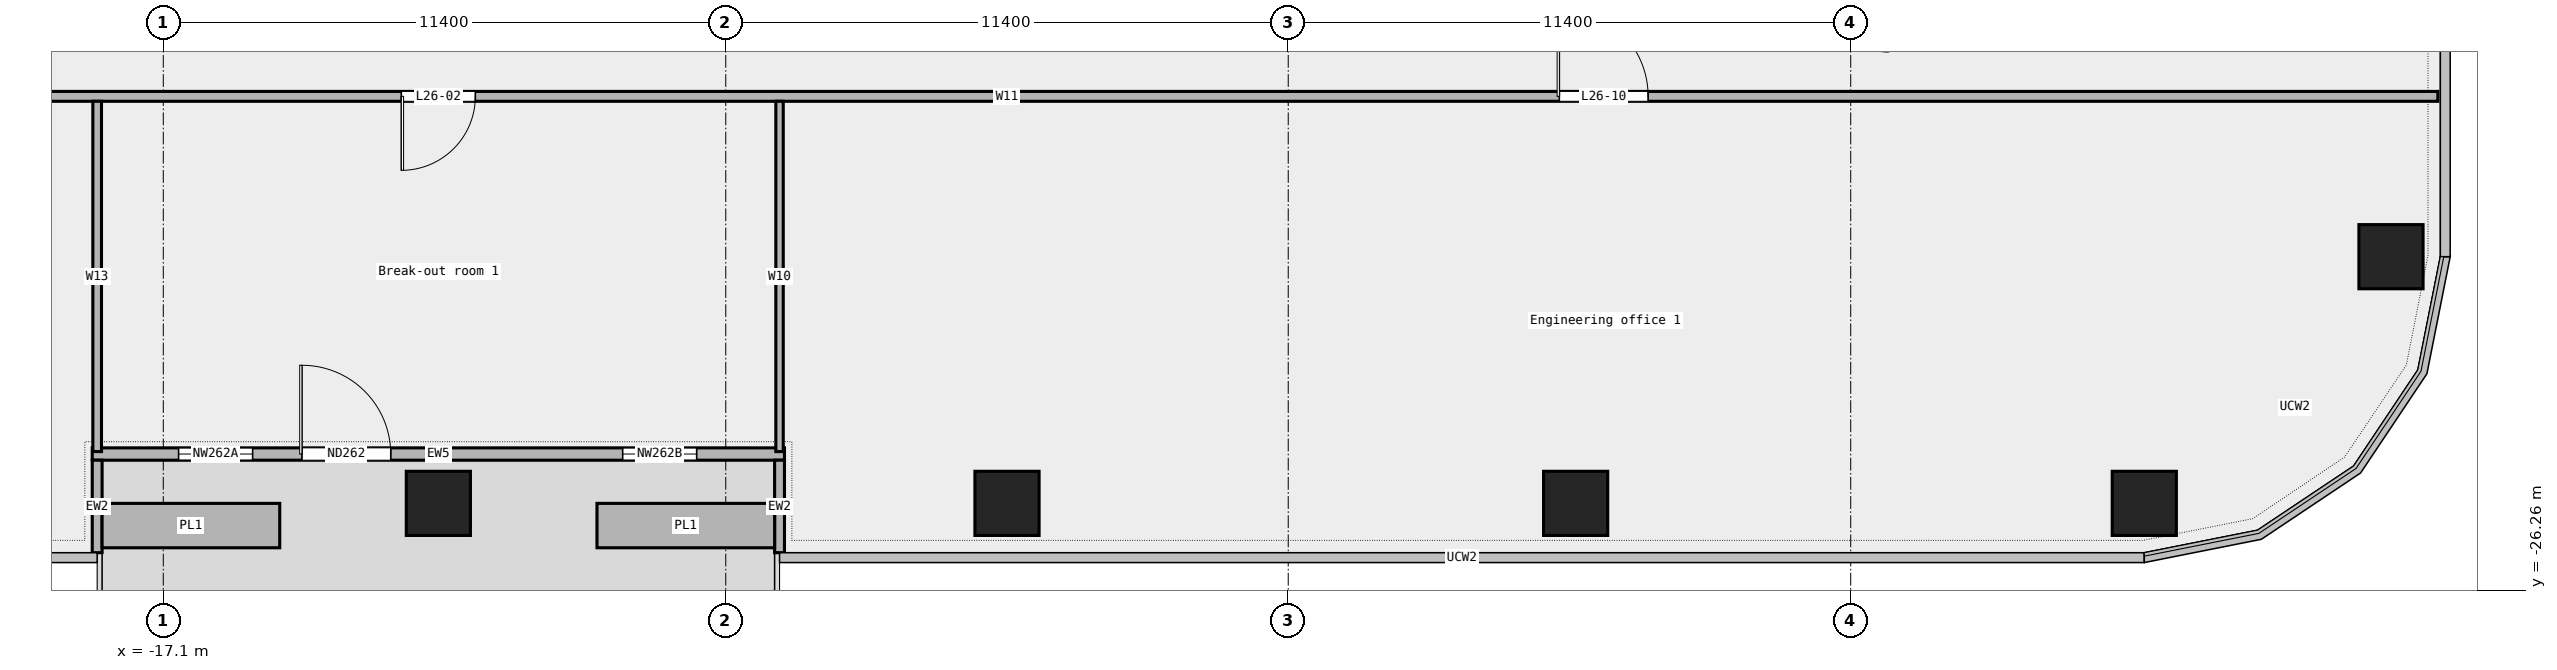
"""IFC4 building model, lengths in metres.
Left out: names, types, materials, properties, quantities, classifications, styles, units other than length and angle.
Written with IfcOpenShell. Run it as: python <this file> out.ifc"""

import sys

from ifc_helpers import new_model, si_unit, direction, frame, frame_2d, origin, origin_2d, place, context, subcontext, project, spatial, rectangle, extrude, element, fill, save


model = new_model("IFC4")
c1 = context("Model", 3, precision=1e-05, world=origin(), true_north=direction((0.0, 1.0)))
c2 = subcontext(c1, "Body", "Model", "MODEL_VIEW")
j1 = project(units=[si_unit("LENGTHUNIT", "METRE"), si_unit("PLANEANGLEUNIT", "RADIAN")], contexts=[c1])
p1 = place(None, origin())
s1 = spatial("IfcSite", under=j1, at=p1, CompositionType="ELEMENT")
p2 = place(p1, origin())
s2 = spatial("IfcBuilding", under=s1, at=p2, CompositionType="ELEMENT")
p3 = place(p2, frame((0.0, 0.0, 130.6)))
s3 = spatial("IfcBuildingStorey", under=s2, at=p3, CompositionType="ELEMENT", Elevation=130.6)
for number, where, z_axis, x_axis in (
    (1, (-11.525, -24.5, 0.0), (0.0, 0.0, 1.0), (1.0, 0.0, 0.0)),
    (2, (0.0, -24.5, 0.0), (0.0, 0.0, 1.0), (1.0, 0.0, 0.0)),
    (3, (11.525, -24.5, 0.0), (0.0, 0.0, 1.0), (1.0, 0.0, 0.0)),
    (4, (23.05, -24.5, 0.0), (0.0, 0.0, 1.0), (1.0, 0.0, 0.0)),
    (5, (28.05, -19.5, 0.0), (0.0, 0.0, 1.0), (1.0, 0.0, 0.0)),
):
    element("IfcColumn", number, at=place(p3, frame(where, z_axis=z_axis, x_axis=x_axis)), inside=s3, PredefinedType="COLUMN", context=c2, shape_type="SweptSolid", body=[
        extrude(rectangle(XDim=1.3, YDim=1.3, at=origin_2d()), origin(), (0.0, 0.0, 1.0), 4.05),
    ])
p4 = place(p3, frame((-18.54, -23.5, 0.0), z_axis=(0.0, 0.0, 1.0), x_axis=(1.0, 0.0, 0.0)))
e6 = element("IfcWall", 6, at=p4, inside=s3, PredefinedType="STANDARD", context=c2, shape_type="SweptSolid", body=[
    extrude(rectangle(XDim=14.03, YDim=0.25, at=frame_2d((7.015, 0.0))), origin(), (0.0, 0.0, 1.0), 4.05),
])
p5 = place(p4, frame((1.75, 0.0, 0.45)))
e7 = element("IfcOpeningElement", 7, at=p5, cuts=e6, PredefinedType="OPENING", context=c2, shape_type="SweptSolid", body=[
    extrude(rectangle(XDim=1.5, YDim=3.0, at=frame_2d((0.75, 1.5))), frame((0.0, 0.137, 0.0), z_axis=(0.0, -1.0, 0.0), x_axis=(1.0, 0.0, 0.0)), (0.0, 0.0, 1.0), 0.274),
])
p6 = place(p4, frame((4.25, 0.0, 0.0)))
e8 = element("IfcOpeningElement", 8, at=p6, cuts=e6, PredefinedType="OPENING", context=c2, shape_type="SweptSolid", body=[
    extrude(rectangle(XDim=1.8, YDim=2.4, at=frame_2d((0.9, 1.2))), frame((0.0, 0.137, 0.0), z_axis=(0.0, -1.0, 0.0), x_axis=(1.0, 0.0, 0.0)), (0.0, 0.0, 1.0), 0.274),
])
p7 = place(p4, frame((10.75, 0.0, 0.45)))
e9 = element("IfcOpeningElement", 9, at=p7, cuts=e6, PredefinedType="OPENING", context=c2, shape_type="SweptSolid", body=[
    extrude(rectangle(XDim=1.5, YDim=3.0, at=frame_2d((0.75, 1.5))), frame((0.0, 0.137, 0.0), z_axis=(0.0, -1.0, 0.0), x_axis=(1.0, 0.0, 0.0)), (0.0, 0.0, 1.0), 0.274),
])
for number, where, z_axis, x_axis in (
    (10, (-18.44, -25.5, 0.0), (0.0, 0.0, 1.0), (0.0, 1.0, 0.0)),
    (11, (-4.61, -25.5, 0.0), (0.0, 0.0, 1.0), (0.0, 1.0, 0.0)),
):
    element("IfcWall", number, at=place(p3, frame(where, z_axis=z_axis, x_axis=x_axis)), inside=s3, PredefinedType="STANDARD", context=c2, shape_type="SweptSolid", body=[
        extrude(rectangle(XDim=1.875, YDim=0.2, at=frame_2d((0.938, 0.0))), origin(), (0.0, 0.0, 1.0), 4.05),
    ])
for number, where, z_axis, x_axis in (
    (12, (-18.34, -24.95, 0.0), (0.0, 0.0, 1.0), (1.0, 0.0, 0.0)),
    (13, (-8.31, -24.95, 0.0), (0.0, 0.0, 1.0), (1.0, 0.0, 0.0)),
):
    element("IfcWall", number, at=place(p3, frame(where, z_axis=z_axis, x_axis=x_axis)), inside=s3, PredefinedType="STANDARD", context=c2, shape_type="SweptSolid", body=[
        extrude(rectangle(XDim=3.6, YDim=0.9, at=frame_2d((1.8, 0.0))), origin(), (0.0, 0.0, 1.0), 0.7),
    ])
p8 = place(p3, frame((-29.0, -16.25, 0.0), z_axis=(0.0, 0.0, 1.0), x_axis=(1.0, 0.0, 0.0)))
e14 = element("IfcWall", 14, at=p8, inside=s3, PredefinedType="PARTITIONING", context=c2, shape_type="SweptSolid", body=[
    extrude(rectangle(XDim=58.0, YDim=0.2, at=frame_2d((29.0, 0.0))), origin(), (0.0, 0.0, 1.0), 4.05),
])
p9 = place(p8, frame((16.725, 0.0, 0.0)))
e15 = element("IfcOpeningElement", 15, at=p9, cuts=e14, PredefinedType="OPENING", context=c2, shape_type="SweptSolid", body=[
    extrude(rectangle(XDim=1.5, YDim=2.1, at=frame_2d((0.75, 1.05))), frame((0.0, 0.112, 0.0), z_axis=(0.0, -1.0, 0.0), x_axis=(1.0, 0.0, 0.0)), (0.0, 0.0, 1.0), 0.224),
])
p10 = place(p8, frame((4.78, 0.0, 0.0)))
e16 = element("IfcOpeningElement", 16, at=p10, cuts=e14, PredefinedType="OPENING", context=c2, shape_type="SweptSolid", body=[
    extrude(rectangle(XDim=1.2, YDim=2.1, at=frame_2d((0.6, 1.05))), frame((0.0, 0.112, 0.0), z_axis=(0.0, -1.0, 0.0), x_axis=(1.0, 0.0, 0.0)), (0.0, 0.0, 1.0), 0.224),
])
p11 = place(p8, frame((40.195, 0.0, 0.0)))
e17 = element("IfcOpeningElement", 17, at=p11, cuts=e14, PredefinedType="OPENING", context=c2, shape_type="SweptSolid", body=[
    extrude(rectangle(XDim=1.8, YDim=2.1, at=frame_2d((0.9, 1.05))), frame((0.0, 0.112, 0.0), z_axis=(0.0, -1.0, 0.0), x_axis=(1.0, 0.0, 0.0)), (0.0, 0.0, 1.0), 0.224),
])
p12 = place(p3, frame((-18.44, -23.45, 0.0), z_axis=(0.0, 0.0, 1.0), x_axis=(0.0, 1.0, 0.0)))
e18 = element("IfcWall", 18, at=p12, inside=s3, PredefinedType="PARTITIONING", context=c2, shape_type="SweptSolid", body=[
    extrude(rectangle(XDim=7.1, YDim=0.175, at=frame_2d((3.55, 0.0))), origin(), (0.0, 0.0, 1.0), 4.05),
])
p13 = place(p3, frame((-4.61, -23.45, 0.0), z_axis=(0.0, 0.0, 1.0), x_axis=(0.0, 1.0, 0.0)))
e19 = element("IfcWall", 19, at=p13, inside=s3, PredefinedType="PARTITIONING", context=c2, shape_type="SweptSolid", body=[
    extrude(rectangle(XDim=7.1, YDim=0.15, at=frame_2d((3.55, 0.0))), origin(), (0.0, 0.0, 1.0), 4.05),
])
p14 = place(p5, origin())
e20 = element("IfcWindow", 20, at=p14, inside=s3, PartitioningType="SINGLE_PANEL", PredefinedType="WINDOW", context=c2, shape_type="SweptSolid", body=[
    extrude(rectangle(XDim=1.5, YDim=3.0, at=frame_2d((0.75, 1.5))), frame((0.0, 0.03, 0.0), z_axis=(0.0, -1.0, 0.0), x_axis=(1.0, 0.0, 0.0)), (0.0, 0.0, 1.0), 0.06),
])
fill(e7, e20)
p15 = place(p6, origin())
e21 = element("IfcDoor", 21, at=p15, inside=s3, OperationType="DOUBLE_DOOR_SINGLE_SWING", PredefinedType="DOOR", context=c2, shape_type="SweptSolid", body=[
    extrude(rectangle(XDim=1.8, YDim=2.4, at=frame_2d((0.9, 1.2))), frame((0.0, 0.025, 0.0), z_axis=(0.0, -1.0, 0.0), x_axis=(1.0, 0.0, 0.0)), (0.0, 0.0, 1.0), 0.05),
])
fill(e8, e21)
p16 = place(p7, origin())
e22 = element("IfcWindow", 22, at=p16, inside=s3, PartitioningType="SINGLE_PANEL", PredefinedType="WINDOW", context=c2, shape_type="SweptSolid", body=[
    extrude(rectangle(XDim=1.5, YDim=3.0, at=frame_2d((0.75, 1.5))), frame((0.0, 0.03, 0.0), z_axis=(0.0, -1.0, 0.0), x_axis=(1.0, 0.0, 0.0)), (0.0, 0.0, 1.0), 0.06),
])
fill(e9, e22)
p17 = place(p9, origin())
e23 = element("IfcDoor", 23, at=p17, inside=s3, OperationType="DOUBLE_DOOR_SINGLE_SWING", PredefinedType="DOOR", context=c2, shape_type="SweptSolid", body=[
    extrude(rectangle(XDim=1.5, YDim=2.1, at=frame_2d((0.75, 1.05))), frame((0.0, 0.025, 0.0), z_axis=(0.0, -1.0, 0.0), x_axis=(1.0, 0.0, 0.0)), (0.0, 0.0, 1.0), 0.05),
])
fill(e15, e23)
p18 = place(p11, origin())
e24 = element("IfcDoor", 24, at=p18, inside=s3, OperationType="DOUBLE_DOOR_SINGLE_SWING", PredefinedType="DOOR", context=c2, shape_type="SweptSolid", body=[
    extrude(rectangle(XDim=1.8, YDim=2.1, at=frame_2d((0.9, 1.05))), frame((0.0, 0.025, 0.0), z_axis=(0.0, -1.0, 0.0), x_axis=(1.0, 0.0, 0.0)), (0.0, 0.0, 1.0), 0.05),
])
fill(e17, e24)
save(model, sys.argv[1])
